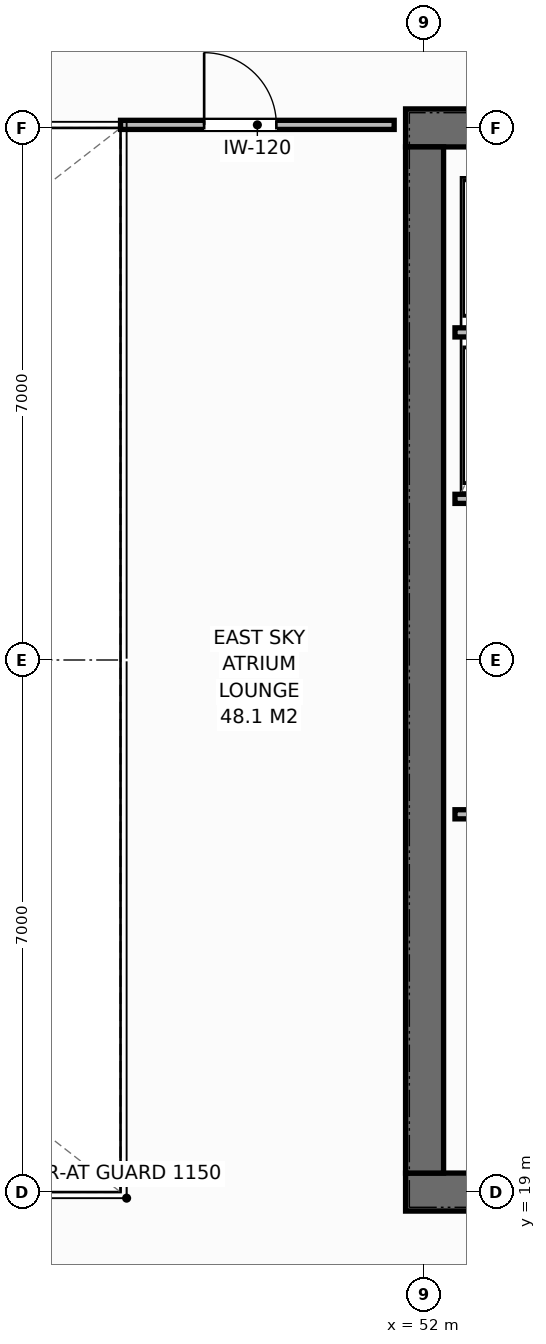
"""IFC4 building model, lengths in metres.
Left out: names, types, materials, properties, quantities, classifications, styles, units other than length and angle.
Written with IfcOpenShell. Run it as: python <this file> out.ifc"""

import sys

from ifc_helpers import new_model, si_unit, direction, frame, frame_2d, origin, place, context, subcontext, project, spatial, rectangle, extrude, element, fill, save


model = new_model("IFC4")
c1 = context("Model", 3, precision=1e-05, world=origin(), true_north=direction((0.0, 1.0)))
c2 = subcontext(c1, "Body", "Model", "MODEL_VIEW")
j1 = project(units=[si_unit("LENGTHUNIT", "METRE"), si_unit("PLANEANGLEUNIT", "RADIAN")], contexts=[c1])
p1 = place(None, origin())
s1 = spatial("IfcSite", under=j1, at=p1, CompositionType="ELEMENT")
p2 = place(p1, origin())
s2 = spatial("IfcBuilding", under=s1, at=p2, CompositionType="ELEMENT")
p3 = place(p2, frame((0.0, 0.0, 244.2)))
s3 = spatial("IfcBuildingStorey", under=s2, at=p3, CompositionType="ELEMENT", Elevation=244.2)
p4 = place(p3, frame((51.75, 19.0, 0.0), z_axis=(0.0, 0.0, 1.0), x_axis=(1.0, 0.0, 0.0)))
e1 = element("IfcWall", 1, at=p4, inside=s3, PredefinedType="SHEAR", context=c2, shape_type="SweptSolid", body=[
    extrude(rectangle(XDim=13.5, YDim=0.5, at=frame_2d((6.75, 0.0))), origin(), (0.0, 0.0, 1.0), 3.8),
])
p5 = place(p4, frame((2.97, 0.0, 0.0)))
e2 = element("IfcOpeningElement", 2, at=p5, cuts=e1, PredefinedType="OPENING", context=c2, shape_type="SweptSolid", body=[
    extrude(rectangle(XDim=1.4, YDim=2.2, at=frame_2d((0.7, 1.1))), frame((0.0, 0.26, 0.0), z_axis=(0.0, -1.0, 0.0), x_axis=(1.0, 0.0, 0.0)), (0.0, 0.0, 1.0), 0.52),
])
p6 = place(p3, frame((51.75, 33.0, 0.0), z_axis=(0.0, 0.0, 1.0), x_axis=(1.0, 0.0, 0.0)))
e3 = element("IfcWall", 3, at=p6, inside=s3, PredefinedType="SHEAR", context=c2, shape_type="SweptSolid", body=[
    extrude(rectangle(XDim=13.5, YDim=0.5, at=frame_2d((6.75, 0.0))), origin(), (0.0, 0.0, 1.0), 3.8),
])
p7 = place(p6, frame((2.97, 0.0, 0.0)))
e4 = element("IfcOpeningElement", 4, at=p7, cuts=e3, PredefinedType="OPENING", context=c2, shape_type="SweptSolid", body=[
    extrude(rectangle(XDim=1.4, YDim=2.2, at=frame_2d((0.7, 1.1))), frame((0.0, 0.26, 0.0), z_axis=(0.0, -1.0, 0.0), x_axis=(1.0, 0.0, 0.0)), (0.0, 0.0, 1.0), 0.52),
])
p8 = place(p6, frame((10.85, 0.0, 0.0)))
e5 = element("IfcOpeningElement", 5, at=p8, cuts=e3, PredefinedType="OPENING", context=c2, shape_type="SweptSolid", body=[
    extrude(rectangle(XDim=0.9, YDim=2.15, at=frame_2d((0.45, 1.075))), frame((0.0, 0.26, 0.0), z_axis=(0.0, -1.0, 0.0), x_axis=(1.0, 0.0, 0.0)), (0.0, 0.0, 1.0), 0.52),
])
p9 = place(p6, frame((5.8, 0.0, 0.0)))
e6 = element("IfcOpeningElement", 6, at=p9, cuts=e3, PredefinedType="OPENING", context=c2, shape_type="SweptSolid", body=[
    extrude(rectangle(XDim=0.9, YDim=2.15, at=frame_2d((0.45, 1.075))), frame((0.0, 0.26, 0.0), z_axis=(0.0, -1.0, 0.0), x_axis=(1.0, 0.0, 0.0)), (0.0, 0.0, 1.0), 0.52),
])
p10 = place(p6, frame((8.2, 0.0, 0.0)))
e7 = element("IfcOpeningElement", 7, at=p10, cuts=e3, PredefinedType="OPENING", context=c2, shape_type="SweptSolid", body=[
    extrude(rectangle(XDim=0.95, YDim=2.15, at=frame_2d((0.475, 1.075))), frame((0.0, 0.26, 0.0), z_axis=(0.0, -1.0, 0.0), x_axis=(1.0, 0.0, 0.0)), (0.0, 0.0, 1.0), 0.52),
])
p11 = place(p3, frame((52.0, 19.25, 0.0), z_axis=(0.0, 0.0, 1.0), x_axis=(0.0, 1.0, 0.0)))
e8 = element("IfcWall", 8, at=p11, inside=s3, PredefinedType="SHEAR", context=c2, shape_type="SweptSolid", body=[
    extrude(rectangle(XDim=13.5, YDim=0.5, at=frame_2d((6.75, 0.0))), origin(), (0.0, 0.0, 1.0), 3.8),
])
for number, where, z_axis, x_axis in (
    (9, (52.4, 23.97, 0.0), (0.0, 0.0, 1.0), (1.0, 0.0, 0.0)),
    (10, (52.4, 28.12, 0.0), (0.0, 0.0, 1.0), (1.0, 0.0, 0.0)),
    (11, (52.4, 30.31, 0.0), (0.0, 0.0, 1.0), (1.0, 0.0, 0.0)),
):
    element("IfcWall", number, at=place(p3, frame(where, z_axis=z_axis, x_axis=x_axis)), inside=s3, PredefinedType="PARTITIONING", context=c2, shape_type="SweptSolid", body=[
        extrude(rectangle(XDim=2.2, YDim=0.12, at=frame_2d((1.1, 0.0))), origin(), (0.0, 0.0, 1.0), 3.58),
    ])
p12 = place(p3, frame((48.0, 33.04, 0.0), z_axis=(0.0, 0.0, 1.0), x_axis=(1.0, 0.0, 0.0)))
e12 = element("IfcWall", 12, at=p12, inside=s3, PredefinedType="PARTITIONING", context=c2, shape_type="SweptSolid", body=[
    extrude(rectangle(XDim=3.6, YDim=0.12, at=frame_2d((1.8, 0.0))), origin(), (0.0, 0.0, 1.0), 3.32),
])
p13 = place(p12, frame((1.1, 0.0, 0.0)))
e13 = element("IfcOpeningElement", 13, at=p13, cuts=e12, PredefinedType="OPENING", context=c2, shape_type="SweptSolid", body=[
    extrude(rectangle(XDim=0.95, YDim=2.15, at=frame_2d((0.475, 1.075))), frame((0.0, 0.07, 0.0), z_axis=(0.0, -1.0, 0.0), x_axis=(1.0, 0.0, 0.0)), (0.0, 0.0, 1.0), 0.14),
])
p14 = place(p13, origin())
e14 = element("IfcDoor", 14, at=p14, inside=s3, OperationType="SINGLE_SWING_LEFT", PredefinedType="DOOR", context=c2, shape_type="SweptSolid", body=[
    extrude(rectangle(XDim=0.95, YDim=2.15, at=frame_2d((0.475, 1.075))), frame((0.0, 0.025, 0.0), z_axis=(0.0, -1.0, 0.0), x_axis=(1.0, 0.0, 0.0)), (0.0, 0.0, 1.0), 0.05),
])
fill(e13, e14)
save(model, sys.argv[1])
